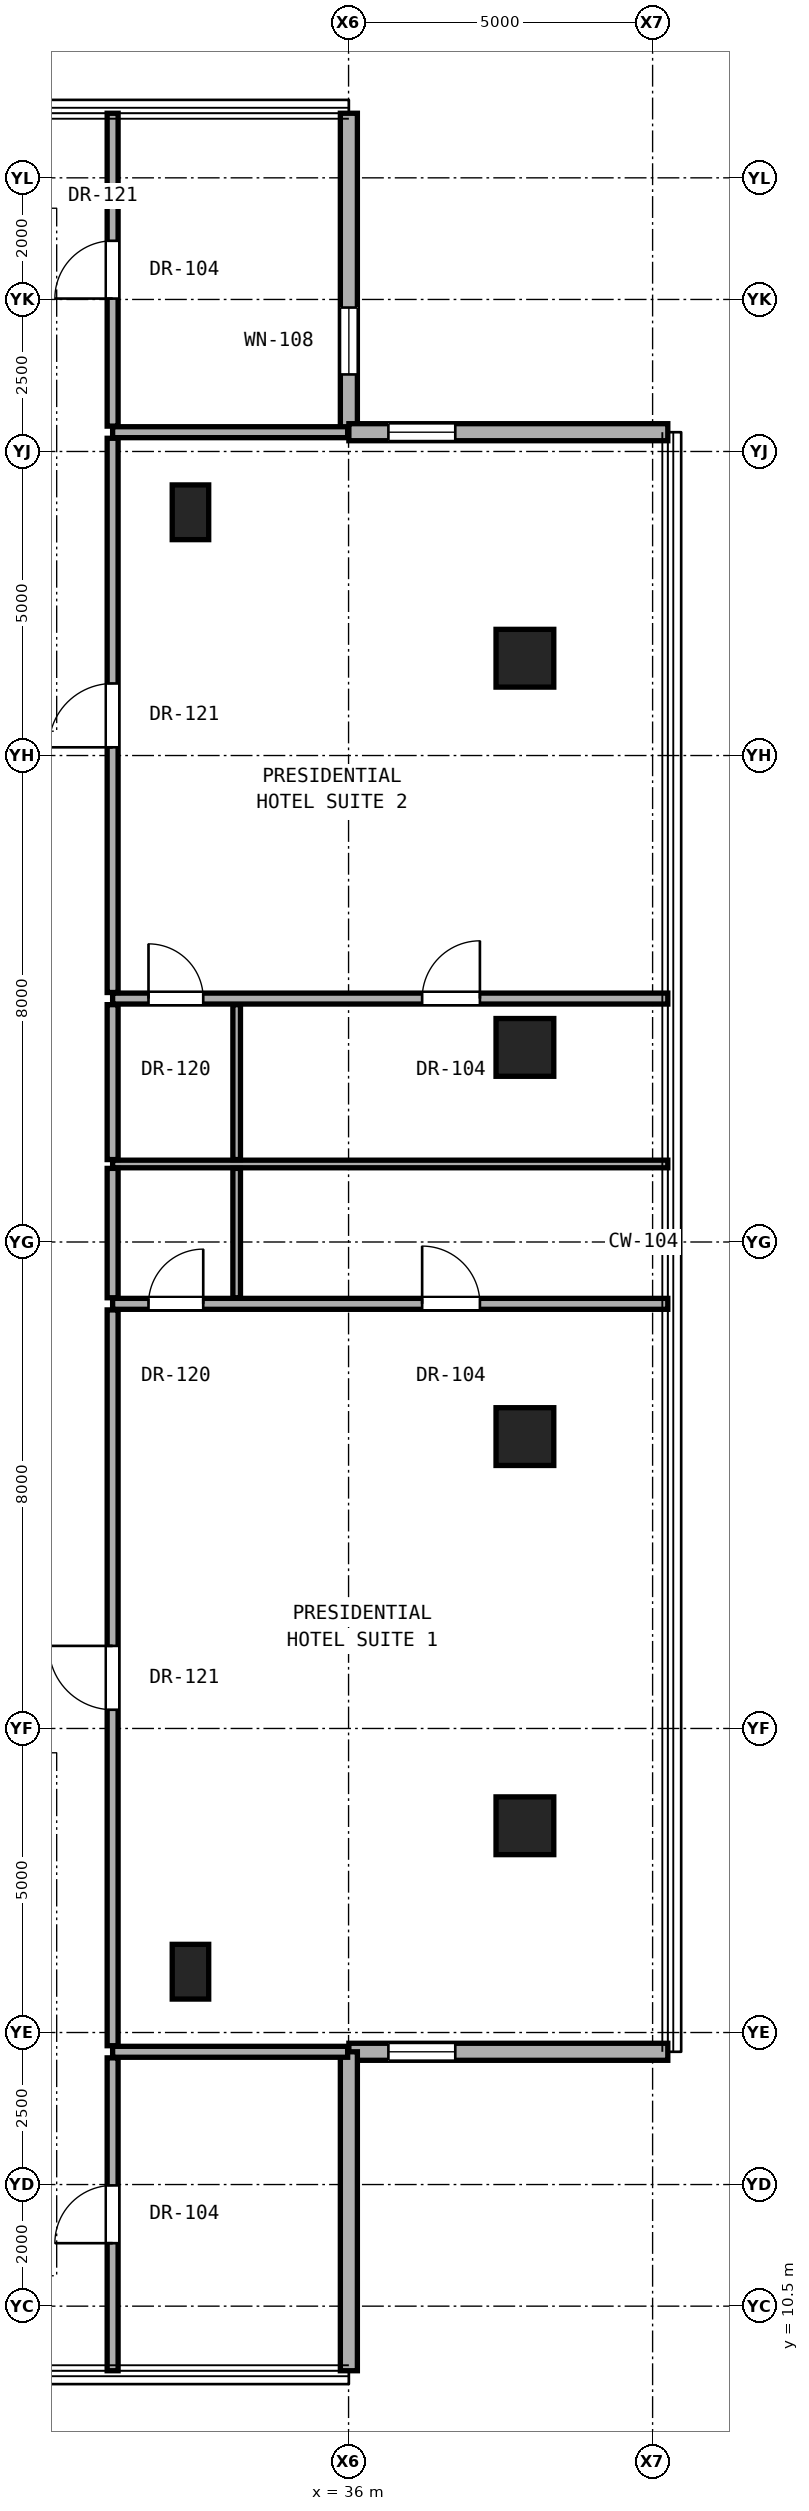
"""IFC4 building model, lengths in metres.
Left out: names, types, materials, properties, quantities, classifications, styles, units other than length and angle.
Written with IfcOpenShell. Run it as: python <this file> out.ifc"""

import sys

from ifc_helpers import new_model, si_unit, direction, frame, frame_2d, origin, origin_2d, place, context, subcontext, project, spatial, rectangle, hollow_rectangle, extrude, element, fill, save


model = new_model("IFC4")
c1 = context("Model", 3, precision=1e-05, world=origin(), true_north=direction((0.0, 1.0)))
c2 = subcontext(c1, "Body", "Model", "MODEL_VIEW")
j1 = project(units=[si_unit("LENGTHUNIT", "METRE"), si_unit("PLANEANGLEUNIT", "RADIAN")], contexts=[c1])
p1 = place(None, origin())
s1 = spatial("IfcSite", under=j1, at=p1, CompositionType="ELEMENT")
p2 = place(p1, origin())
s2 = spatial("IfcBuilding", under=s1, at=p2, CompositionType="ELEMENT")
p3 = place(p2, frame((0.0, 0.0, 167.4)))
s3 = spatial("IfcBuildingStorey", under=s2, at=p3, CompositionType="ELEMENT", Elevation=167.4)
for number, where, z_axis, x_axis in (
    (1, (38.9, 18.4, 0.0), (0.0, 0.0, 1.0), (1.0, 0.0, 0.0)),
    (2, (38.9, 24.8, 0.0), (0.0, 0.0, 1.0), (1.0, 0.0, 0.0)),
    (3, (38.9, 31.2, 0.0), (0.0, 0.0, 1.0), (1.0, 0.0, 0.0)),
    (4, (38.9, 37.6, 0.0), (0.0, 0.0, 1.0), (1.0, 0.0, 0.0)),
):
    element("IfcColumn", number, at=place(p3, frame(where, z_axis=z_axis, x_axis=x_axis)), inside=s3, PredefinedType="COLUMN", context=c2, shape_type="SweptSolid", body=[
        extrude(hollow_rectangle(XDim=0.95, YDim=0.95, WallThickness=0.05, at=origin_2d()), origin(), (0.0, 0.0, 1.0), 3.25),
    ])
for number, where, z_axis, x_axis in (
    (5, (33.4, 16.0, 0.0), (0.0, 0.0, 1.0), (1.0, 0.0, 0.0)),
    (6, (33.4, 40.0, 0.0), (0.0, 0.0, 1.0), (1.0, 0.0, 0.0)),
):
    element("IfcColumn", number, at=place(p3, frame(where, z_axis=z_axis, x_axis=x_axis)), inside=s3, PredefinedType="PILASTER", context=c2, shape_type="SweptSolid", body=[
        extrude(rectangle(XDim=0.6, YDim=0.9, at=origin_2d()), origin(), (0.0, 0.0, 1.0), 3.25),
    ])
p4 = place(p3, frame((36.005, 41.317, 0.0), z_axis=(0.0, 0.0, 1.0), x_axis=(0.0, 1.0, 0.0)))
e7 = element("IfcWall", 7, at=p4, inside=s3, PredefinedType="SOLIDWALL", context=c2, shape_type="SweptSolid", body=[
    extrude(rectangle(XDim=5.245, YDim=0.28, at=frame_2d((2.623, 0.0))), origin(), (0.0, 0.0, 1.0), 3.03),
])
p5 = place(p4, frame((0.95, 0.0, 0.85)))
e8 = element("IfcOpeningElement", 8, at=p5, cuts=e7, PredefinedType="OPENING", context=c2, shape_type="SweptSolid", body=[
    extrude(rectangle(XDim=1.1, YDim=2.0, at=frame_2d((0.55, 1.0))), frame((0.0, 0.15, 0.0), z_axis=(0.0, -1.0, 0.0), x_axis=(1.0, 0.0, 0.0)), (0.0, 0.0, 1.0), 0.3),
])
p6 = place(p3, frame((36.005, 14.683, 0.0), z_axis=(0.0, 0.0, 1.0), x_axis=(1.0, 0.0, 0.0)))
e9 = element("IfcWall", 9, at=p6, inside=s3, PredefinedType="SOLIDWALL", context=c2, shape_type="SweptSolid", body=[
    extrude(rectangle(XDim=5.245, YDim=0.28, at=frame_2d((2.623, 0.0))), origin(), (0.0, 0.0, 1.0), 3.03),
])
p7 = place(p6, frame((0.65, 0.0, 0.85)))
e10 = element("IfcOpeningElement", 10, at=p7, cuts=e9, PredefinedType="OPENING", context=c2, shape_type="SweptSolid", body=[
    extrude(rectangle(XDim=1.1, YDim=2.0, at=frame_2d((0.55, 1.0))), frame((0.0, 0.15, 0.0), z_axis=(0.0, -1.0, 0.0), x_axis=(1.0, 0.0, 0.0)), (0.0, 0.0, 1.0), 0.3),
])
p8 = place(p3, frame((36.005, 9.438, 0.0), z_axis=(0.0, 0.0, 1.0), x_axis=(0.0, 1.0, 0.0)))
e11 = element("IfcWall", 11, at=p8, inside=s3, PredefinedType="SOLIDWALL", context=c2, shape_type="SweptSolid", body=[
    extrude(rectangle(XDim=5.245, YDim=0.28, at=frame_2d((2.623, 0.0))), origin(), (0.0, 0.0, 1.0), 3.03),
])
p9 = place(p3, frame((41.25, 41.317, 0.0), z_axis=(0.0, 0.0, 1.0), x_axis=(-1.0, 0.0, 0.0)))
e12 = element("IfcWall", 12, at=p9, inside=s3, PredefinedType="SOLIDWALL", context=c2, shape_type="SweptSolid", body=[
    extrude(rectangle(XDim=5.245, YDim=0.28, at=frame_2d((2.623, 0.0))), origin(), (0.0, 0.0, 1.0), 3.03),
])
p10 = place(p9, frame((3.495, 0.0, 0.85)))
e13 = element("IfcOpeningElement", 13, at=p10, cuts=e12, PredefinedType="OPENING", context=c2, shape_type="SweptSolid", body=[
    extrude(rectangle(XDim=1.1, YDim=2.0, at=frame_2d((0.55, 1.0))), frame((0.0, 0.15, 0.0), z_axis=(0.0, -1.0, 0.0), x_axis=(1.0, 0.0, 0.0)), (0.0, 0.0, 1.0), 0.3),
])
p11 = place(p3, frame((32.12, 14.683, 0.0), z_axis=(0.0, 0.0, 1.0), x_axis=(1.0, 0.0, 0.0)))
e14 = element("IfcWall", 14, at=p11, inside=s3, PredefinedType="PARTITIONING", context=c2, shape_type="SweptSolid", body=[
    extrude(rectangle(XDim=3.865, YDim=0.18, at=frame_2d((1.933, 0.0))), origin(), (0.0, 0.0, 1.0), 3.05),
])
p12 = place(p3, frame((32.12, 26.983, 0.0), z_axis=(0.0, 0.0, 1.0), x_axis=(1.0, 0.0, 0.0)))
e15 = element("IfcWall", 15, at=p12, inside=s3, PredefinedType="PARTITIONING", context=c2, shape_type="SweptSolid", body=[
    extrude(rectangle(XDim=9.13, YDim=0.18, at=frame_2d((4.565, 0.0))), origin(), (0.0, 0.0, 1.0), 2.269),
])
p13 = place(p12, frame((5.09, 0.0, 0.0)))
e16 = element("IfcOpeningElement", 16, at=p13, cuts=e15, PredefinedType="OPENING", context=c2, shape_type="SweptSolid", body=[
    extrude(rectangle(XDim=0.95, YDim=2.15, at=frame_2d((0.475, 1.075))), frame((0.0, 0.1, 0.0), z_axis=(0.0, -1.0, 0.0), x_axis=(1.0, 0.0, 0.0)), (0.0, 0.0, 1.0), 0.2),
])
p14 = place(p12, frame((0.59, 0.0, 0.0)))
e17 = element("IfcOpeningElement", 17, at=p14, cuts=e15, PredefinedType="OPENING", context=c2, shape_type="SweptSolid", body=[
    extrude(rectangle(XDim=0.9, YDim=2.1, at=frame_2d((0.45, 1.05))), frame((0.0, 0.1, 0.0), z_axis=(0.0, -1.0, 0.0), x_axis=(1.0, 0.0, 0.0)), (0.0, 0.0, 1.0), 0.2),
])
p15 = place(p3, frame((32.12, 29.283, 0.0), z_axis=(0.0, 0.0, 1.0), x_axis=(1.0, 0.0, 0.0)))
e18 = element("IfcWall", 18, at=p15, inside=s3, PredefinedType="PARTITIONING", context=c2, shape_type="SweptSolid", body=[
    extrude(rectangle(XDim=9.13, YDim=0.125, at=frame_2d((4.565, 0.0))), origin(), (0.0, 0.0, 1.0), 2.269),
])
p16 = place(p3, frame((32.12, 32.003, 0.0), z_axis=(0.0, 0.0, 1.0), x_axis=(1.0, 0.0, 0.0)))
e19 = element("IfcWall", 19, at=p16, inside=s3, PredefinedType="PARTITIONING", context=c2, shape_type="SweptSolid", body=[
    extrude(rectangle(XDim=9.13, YDim=0.18, at=frame_2d((4.565, 0.0))), origin(), (0.0, 0.0, 1.0), 2.269),
])
p17 = place(p16, frame((5.09, 0.0, 0.0)))
e20 = element("IfcOpeningElement", 20, at=p17, cuts=e19, PredefinedType="OPENING", context=c2, shape_type="SweptSolid", body=[
    extrude(rectangle(XDim=0.95, YDim=2.15, at=frame_2d((0.475, 1.075))), frame((0.0, 0.1, 0.0), z_axis=(0.0, -1.0, 0.0), x_axis=(1.0, 0.0, 0.0)), (0.0, 0.0, 1.0), 0.2),
])
p18 = place(p16, frame((0.59, 0.0, 0.0)))
e21 = element("IfcOpeningElement", 21, at=p18, cuts=e19, PredefinedType="OPENING", context=c2, shape_type="SweptSolid", body=[
    extrude(rectangle(XDim=0.9, YDim=2.1, at=frame_2d((0.45, 1.05))), frame((0.0, 0.1, 0.0), z_axis=(0.0, -1.0, 0.0), x_axis=(1.0, 0.0, 0.0)), (0.0, 0.0, 1.0), 0.2),
])
p19 = place(p3, frame((32.12, 41.317, 0.0), z_axis=(0.0, 0.0, 1.0), x_axis=(1.0, 0.0, 0.0)))
e22 = element("IfcWall", 22, at=p19, inside=s3, PredefinedType="PARTITIONING", context=c2, shape_type="SweptSolid", body=[
    extrude(rectangle(XDim=3.865, YDim=0.18, at=frame_2d((1.933, 0.0))), origin(), (0.0, 0.0, 1.0), 3.05),
])
p20 = place(p3, frame((32.12, 9.438, 0.0), z_axis=(0.0, 0.0, 1.0), x_axis=(0.0, 1.0, 0.0)))
e23 = element("IfcWall", 23, at=p20, inside=s3, PredefinedType="PARTITIONING", context=c2, shape_type="SweptSolid", body=[
    extrude(rectangle(XDim=5.145, YDim=0.18, at=frame_2d((2.573, 0.0))), origin(), (0.0, 0.0, 1.0), 3.05),
])
p21 = place(p20, frame((2.097, 0.0, 0.0)))
e24 = element("IfcOpeningElement", 24, at=p21, cuts=e23, PredefinedType="OPENING", context=c2, shape_type="SweptSolid", body=[
    extrude(rectangle(XDim=0.95, YDim=2.15, at=frame_2d((0.475, 1.075))), frame((0.0, 0.1, 0.0), z_axis=(0.0, -1.0, 0.0), x_axis=(1.0, 0.0, 0.0)), (0.0, 0.0, 1.0), 0.2),
])
p22 = place(p3, frame((32.12, 14.783, 0.0), z_axis=(0.0, 0.0, 1.0), x_axis=(0.0, 1.0, 0.0)))
e25 = element("IfcWall", 25, at=p22, inside=s3, PredefinedType="PARTITIONING", context=c2, shape_type="SweptSolid", body=[
    extrude(rectangle(XDim=12.1, YDim=0.18, at=frame_2d((6.05, 0.0))), origin(), (0.0, 0.0, 1.0), 2.346),
])
p23 = place(p22, frame((5.525, 0.0, 0.0)))
e26 = element("IfcOpeningElement", 26, at=p23, cuts=e25, PredefinedType="OPENING", context=c2, shape_type="SweptSolid", body=[
    extrude(rectangle(XDim=1.05, YDim=2.2, at=frame_2d((0.525, 1.1))), frame((0.0, 0.1, 0.0), z_axis=(0.0, -1.0, 0.0), x_axis=(1.0, 0.0, 0.0)), (0.0, 0.0, 1.0), 0.2),
])
p24 = place(p3, frame((32.12, 27.083, 0.0), z_axis=(0.0, 0.0, 1.0), x_axis=(0.0, 1.0, 0.0)))
e27 = element("IfcWall", 27, at=p24, inside=s3, PredefinedType="PARTITIONING", context=c2, shape_type="SweptSolid", body=[
    extrude(rectangle(XDim=2.127, YDim=0.18, at=frame_2d((1.064, 0.0))), origin(), (0.0, 0.0, 1.0), 3.05),
])
p25 = place(p3, frame((32.12, 29.355, 0.0), z_axis=(0.0, 0.0, 1.0), x_axis=(0.0, 1.0, 0.0)))
e28 = element("IfcWall", 28, at=p25, inside=s3, PredefinedType="PARTITIONING", context=c2, shape_type="SweptSolid", body=[
    extrude(rectangle(XDim=2.548, YDim=0.18, at=frame_2d((1.274, 0.0))), origin(), (0.0, 0.0, 1.0), 2.346),
])
p26 = place(p3, frame((32.12, 32.103, 0.0), z_axis=(0.0, 0.0, 1.0), x_axis=(0.0, 1.0, 0.0)))
e29 = element("IfcWall", 29, at=p26, inside=s3, PredefinedType="PARTITIONING", context=c2, shape_type="SweptSolid", body=[
    extrude(rectangle(XDim=9.114, YDim=0.18, at=frame_2d((4.557, 0.0))), origin(), (0.0, 0.0, 1.0), 2.442),
])
p27 = place(p26, frame((4.032, 0.0, 0.0)))
e30 = element("IfcOpeningElement", 30, at=p27, cuts=e29, PredefinedType="OPENING", context=c2, shape_type="SweptSolid", body=[
    extrude(rectangle(XDim=1.05, YDim=2.2, at=frame_2d((0.525, 1.1))), frame((0.0, 0.1, 0.0), z_axis=(0.0, -1.0, 0.0), x_axis=(1.0, 0.0, 0.0)), (0.0, 0.0, 1.0), 0.2),
])
p28 = place(p3, frame((32.12, 41.417, 0.0), z_axis=(0.0, 0.0, 1.0), x_axis=(0.0, 1.0, 0.0)))
e31 = element("IfcWall", 31, at=p28, inside=s3, PredefinedType="PARTITIONING", context=c2, shape_type="SweptSolid", body=[
    extrude(rectangle(XDim=5.145, YDim=0.18, at=frame_2d((2.573, 0.0))), origin(), (0.0, 0.0, 1.0), 3.05),
])
p29 = place(p28, frame((2.097, 0.0, 0.0)))
e32 = element("IfcOpeningElement", 32, at=p29, cuts=e31, PredefinedType="OPENING", context=c2, shape_type="SweptSolid", body=[
    extrude(rectangle(XDim=0.95, YDim=2.15, at=frame_2d((0.475, 1.075))), frame((0.0, 0.1, 0.0), z_axis=(0.0, -1.0, 0.0), x_axis=(1.0, 0.0, 0.0)), (0.0, 0.0, 1.0), 0.2),
])
p30 = place(p3, frame((34.16, 27.083, 0.0), z_axis=(0.0, 0.0, 1.0), x_axis=(0.0, 1.0, 0.0)))
e33 = element("IfcWall", 33, at=p30, inside=s3, PredefinedType="PARTITIONING", context=c2, shape_type="SweptSolid", body=[
    extrude(rectangle(XDim=2.127, YDim=0.125, at=frame_2d((1.064, 0.0))), origin(), (0.0, 0.0, 1.0), 3.05),
])
p31 = place(p3, frame((34.16, 29.355, 0.0), z_axis=(0.0, 0.0, 1.0), x_axis=(0.0, 1.0, 0.0)))
e34 = element("IfcWall", 34, at=p31, inside=s3, PredefinedType="PARTITIONING", context=c2, shape_type="SweptSolid", body=[
    extrude(rectangle(XDim=2.548, YDim=0.125, at=frame_2d((1.274, 0.0))), origin(), (0.0, 0.0, 1.0), 2.346),
])
p32 = place(p5, origin())
e35 = element("IfcWindow", 35, at=p32, inside=s3, PartitioningType="SINGLE_PANEL", PredefinedType="WINDOW", context=c2, shape_type="SweptSolid", body=[
    extrude(rectangle(XDim=1.1, YDim=2.0, at=frame_2d((0.55, 1.0))), frame((0.0, 0.03, 0.0), z_axis=(0.0, -1.0, 0.0), x_axis=(1.0, 0.0, 0.0)), (0.0, 0.0, 1.0), 0.06),
])
fill(e8, e35)
p33 = place(p7, origin())
e36 = element("IfcWindow", 36, at=p33, inside=s3, PartitioningType="SINGLE_PANEL", PredefinedType="WINDOW", context=c2, shape_type="SweptSolid", body=[
    extrude(rectangle(XDim=1.1, YDim=2.0, at=frame_2d((0.55, 1.0))), frame((0.0, 0.03, 0.0), z_axis=(0.0, -1.0, 0.0), x_axis=(1.0, 0.0, 0.0)), (0.0, 0.0, 1.0), 0.06),
])
fill(e10, e36)
p34 = place(p10, origin())
e37 = element("IfcWindow", 37, at=p34, inside=s3, PartitioningType="SINGLE_PANEL", PredefinedType="WINDOW", context=c2, shape_type="SweptSolid", body=[
    extrude(rectangle(XDim=1.1, YDim=2.0, at=frame_2d((0.55, 1.0))), frame((0.0, 0.03, 0.0), z_axis=(0.0, -1.0, 0.0), x_axis=(1.0, 0.0, 0.0)), (0.0, 0.0, 1.0), 0.06),
])
fill(e13, e37)
p35 = place(p23, origin())
e38 = element("IfcDoor", 38, at=p35, inside=s3, OperationType="SINGLE_SWING_RIGHT", PredefinedType="DOOR", context=c2, shape_type="SweptSolid", body=[
    extrude(rectangle(XDim=1.05, YDim=2.2, at=frame_2d((0.525, 1.1))), frame((0.0, 0.025, 0.0), z_axis=(0.0, -1.0, 0.0), x_axis=(1.0, 0.0, 0.0)), (0.0, 0.0, 1.0), 0.05),
])
fill(e26, e38)
p36 = place(p13, origin())
e39 = element("IfcDoor", 39, at=p36, inside=s3, OperationType="SINGLE_SWING_LEFT", PredefinedType="DOOR", context=c2, shape_type="SweptSolid", body=[
    extrude(rectangle(XDim=0.95, YDim=2.15, at=frame_2d((0.475, 1.075))), frame((0.0, 0.025, 0.0), z_axis=(0.0, -1.0, 0.0), x_axis=(1.0, 0.0, 0.0)), (0.0, 0.0, 1.0), 0.05),
])
fill(e16, e39)
p37 = place(p14, origin())
e40 = element("IfcDoor", 40, at=p37, inside=s3, OperationType="SINGLE_SWING_RIGHT", PredefinedType="DOOR", context=c2, shape_type="SweptSolid", body=[
    extrude(rectangle(XDim=0.9, YDim=2.1, at=frame_2d((0.45, 1.05))), frame((0.0, 0.025, 0.0), z_axis=(0.0, -1.0, 0.0), x_axis=(1.0, 0.0, 0.0)), (0.0, 0.0, 1.0), 0.05),
])
fill(e17, e40)
p38 = place(p27, origin())
e41 = element("IfcDoor", 41, at=p38, inside=s3, OperationType="SINGLE_SWING_LEFT", PredefinedType="DOOR", context=c2, shape_type="SweptSolid", body=[
    extrude(rectangle(XDim=1.05, YDim=2.2, at=frame_2d((0.525, 1.1))), frame((0.0, 0.025, 0.0), z_axis=(0.0, -1.0, 0.0), x_axis=(1.0, 0.0, 0.0)), (0.0, 0.0, 1.0), 0.05),
])
fill(e30, e41)
p39 = place(p17, origin())
e42 = element("IfcDoor", 42, at=p39, inside=s3, OperationType="SINGLE_SWING_RIGHT", PredefinedType="DOOR", context=c2, shape_type="SweptSolid", body=[
    extrude(rectangle(XDim=0.95, YDim=2.15, at=frame_2d((0.475, 1.075))), frame((0.0, 0.025, 0.0), z_axis=(0.0, -1.0, 0.0), x_axis=(1.0, 0.0, 0.0)), (0.0, 0.0, 1.0), 0.05),
])
fill(e20, e42)
p40 = place(p18, origin())
e43 = element("IfcDoor", 43, at=p40, inside=s3, OperationType="SINGLE_SWING_LEFT", PredefinedType="DOOR", context=c2, shape_type="SweptSolid", body=[
    extrude(rectangle(XDim=0.9, YDim=2.1, at=frame_2d((0.45, 1.05))), frame((0.0, 0.025, 0.0), z_axis=(0.0, -1.0, 0.0), x_axis=(1.0, 0.0, 0.0)), (0.0, 0.0, 1.0), 0.05),
])
fill(e21, e43)
p41 = place(p21, origin())
e44 = element("IfcDoor", 44, at=p41, inside=s3, OperationType="SINGLE_SWING_LEFT", PredefinedType="DOOR", context=c2, shape_type="SweptSolid", body=[
    extrude(rectangle(XDim=0.95, YDim=2.15, at=frame_2d((0.475, 1.075))), frame((0.0, 0.025, 0.0), z_axis=(0.0, -1.0, 0.0), x_axis=(1.0, 0.0, 0.0)), (0.0, 0.0, 1.0), 0.05),
])
fill(e24, e44)
p42 = place(p29, origin())
e45 = element("IfcDoor", 45, at=p42, inside=s3, OperationType="SINGLE_SWING_LEFT", PredefinedType="DOOR", context=c2, shape_type="SweptSolid", body=[
    extrude(rectangle(XDim=0.95, YDim=2.15, at=frame_2d((0.475, 1.075))), frame((0.0, 0.025, 0.0), z_axis=(0.0, -1.0, 0.0), x_axis=(1.0, 0.0, 0.0)), (0.0, 0.0, 1.0), 0.05),
])
fill(e32, e45)
save(model, sys.argv[1])
